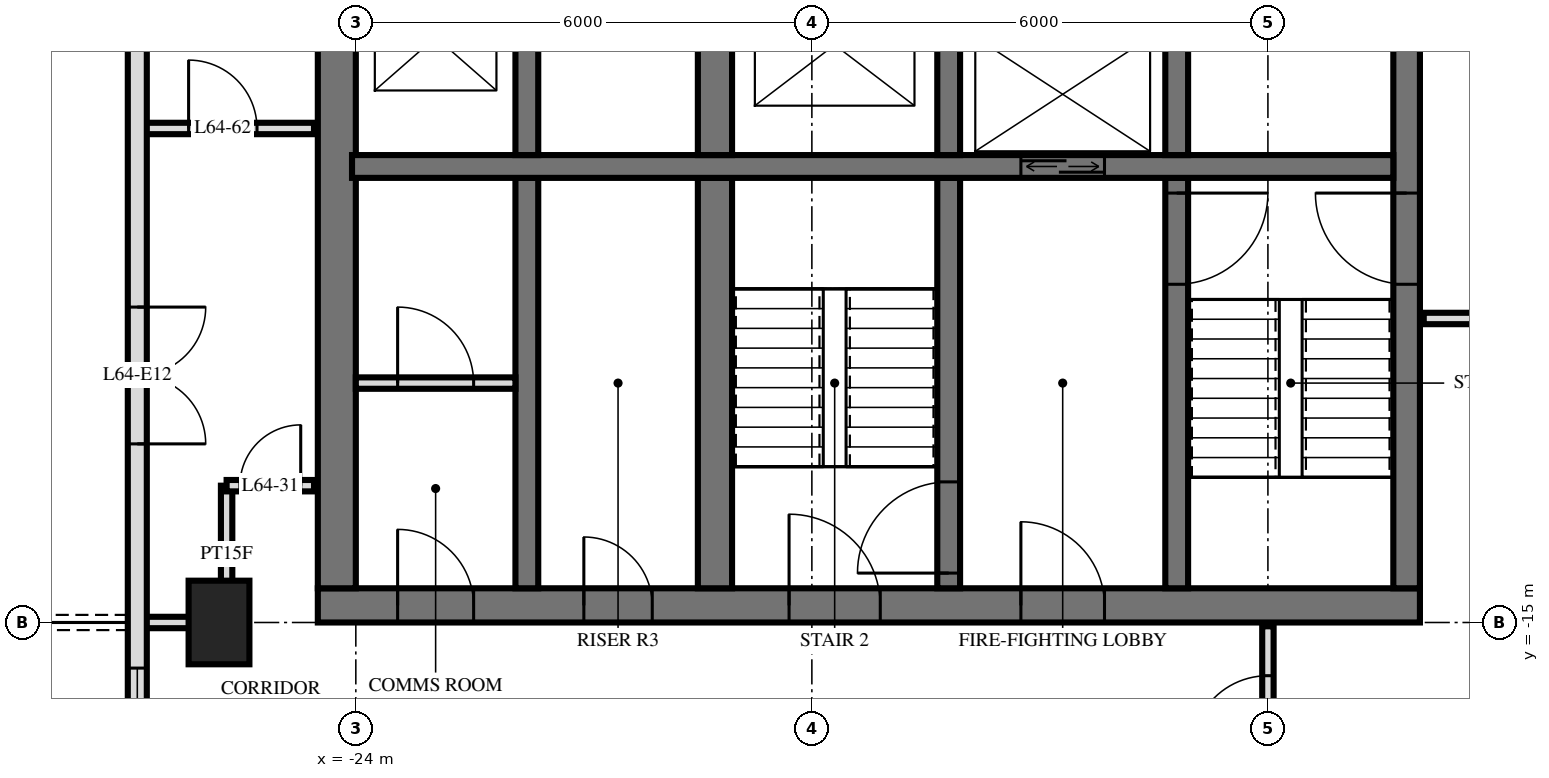
"""IFC4 building model, lengths in metres.
Left out: names, types, materials, properties, quantities, classifications, styles, units other than length and angle.
Written with IfcOpenShell. Run it as: python <this file> out.ifc"""

import sys

from ifc_helpers import new_model, si_unit, direction, frame, frame_2d, origin, origin_2d, place, context, subcontext, project, spatial, rectangle, extrude, element, fill, save


model = new_model("IFC4")
c1 = context("Model", 3, precision=1e-05, world=origin(), true_north=direction((0.0, 1.0)))
c2 = subcontext(c1, "Body", "Model", "MODEL_VIEW")
j1 = project(units=[si_unit("LENGTHUNIT", "METRE"), si_unit("PLANEANGLEUNIT", "RADIAN")], contexts=[c1])
p1 = place(None, origin())
s1 = spatial("IfcSite", under=j1, at=p1, CompositionType="ELEMENT")
p2 = place(p1, origin())
s2 = spatial("IfcBuilding", under=s1, at=p2, CompositionType="ELEMENT")
p3 = place(p2, frame((0.0, 0.0, 243.1)))
s3 = spatial("IfcBuildingStorey", under=s2, at=p3, CompositionType="ELEMENT", Elevation=243.1)
p4 = place(p3, frame((-25.8, -15.0, 0.0), z_axis=(0.0, 0.0, 1.0), x_axis=(0.0, 1.0, 0.0)))
e1 = element("IfcColumn", 1, at=p4, inside=s3, PredefinedType="COLUMN", context=c2, shape_type="SweptSolid", body=[
    extrude(rectangle(XDim=1.1, YDim=0.8, at=origin_2d()), origin(), (0.0, 0.0, 1.0), 3.5),
])
p5 = place(p3, frame((-24.5, -14.775, 0.0), z_axis=(0.0, 0.0, 1.0), x_axis=(1.0, 0.0, 0.0)))
e2 = element("IfcWall", 2, at=p5, inside=s3, PredefinedType="SHEAR", context=c2, shape_type="SweptSolid", body=[
    extrude(rectangle(XDim=14.5, YDim=0.45, at=frame_2d((7.25, 0.0))), origin(), (0.0, 0.0, 1.0), 3.5),
])
p6 = place(p5, frame((6.2, 0.0, 0.0)))
e3 = element("IfcOpeningElement", 3, at=p6, cuts=e2, PredefinedType="OPENING", context=c2, shape_type="SweptSolid", body=[
    extrude(rectangle(XDim=1.2, YDim=2.1, at=frame_2d((0.6, 1.05))), frame((0.0, 0.235, 0.0), z_axis=(0.0, -1.0, 0.0), x_axis=(1.0, 0.0, 0.0)), (0.0, 0.0, 1.0), 0.47),
])
p7 = place(p5, frame((9.25, 0.0, 0.0)))
e4 = element("IfcOpeningElement", 4, at=p7, cuts=e2, PredefinedType="OPENING", context=c2, shape_type="SweptSolid", body=[
    extrude(rectangle(XDim=1.1, YDim=2.1, at=frame_2d((0.55, 1.05))), frame((0.0, 0.235, 0.0), z_axis=(0.0, -1.0, 0.0), x_axis=(1.0, 0.0, 0.0)), (0.0, 0.0, 1.0), 0.47),
])
p8 = place(p5, frame((3.5, 0.0, 0.0)))
e5 = element("IfcOpeningElement", 5, at=p8, cuts=e2, PredefinedType="OPENING", context=c2, shape_type="SweptSolid", body=[
    extrude(rectangle(XDim=0.9, YDim=2.1, at=frame_2d((0.45, 1.05))), frame((0.0, 0.235, 0.0), z_axis=(0.0, -1.0, 0.0), x_axis=(1.0, 0.0, 0.0)), (0.0, 0.0, 1.0), 0.47),
])
p9 = place(p5, frame((1.05, 0.0, 0.0)))
e6 = element("IfcOpeningElement", 6, at=p9, cuts=e2, PredefinedType="OPENING", context=c2, shape_type="SweptSolid", body=[
    extrude(rectangle(XDim=1.0, YDim=2.1, at=frame_2d((0.5, 1.05))), frame((0.0, 0.235, 0.0), z_axis=(0.0, -1.0, 0.0), x_axis=(1.0, 0.0, 0.0)), (0.0, 0.0, 1.0), 0.47),
])
p10 = place(p3, frame((-10.175, -14.55, 0.0), z_axis=(0.0, 0.0, 1.0), x_axis=(0.0, 1.0, 0.0)))
e7 = element("IfcWall", 7, at=p10, inside=s3, PredefinedType="SHEAR", context=c2, shape_type="SweptSolid", body=[
    extrude(rectangle(XDim=14.1, YDim=0.35, at=frame_2d((7.05, 0.0))), origin(), (0.0, 0.0, 1.0), 3.5),
])
p11 = place(p10, frame((8.4, 0.0, 0.0)))
e8 = element("IfcOpeningElement", 8, at=p11, cuts=e7, PredefinedType="OPENING", context=c2, shape_type="SweptSolid", body=[
    extrude(rectangle(XDim=1.4, YDim=2.4, at=frame_2d((0.7, 1.2))), frame((0.0, 0.185, 0.0), z_axis=(0.0, -1.0, 0.0), x_axis=(1.0, 0.0, 0.0)), (0.0, 0.0, 1.0), 0.37),
])
p12 = place(p10, frame((10.0, 0.0, 0.0)))
e9 = element("IfcOpeningElement", 9, at=p12, cuts=e7, PredefinedType="OPENING", context=c2, shape_type="SweptSolid", body=[
    extrude(rectangle(XDim=1.4, YDim=2.4, at=frame_2d((0.7, 1.2))), frame((0.0, 0.185, 0.0), z_axis=(0.0, -1.0, 0.0), x_axis=(1.0, 0.0, 0.0)), (0.0, 0.0, 1.0), 0.37),
])
p13 = place(p10, frame((4.0, 0.0, 0.0)))
e10 = element("IfcOpeningElement", 10, at=p13, cuts=e7, PredefinedType="OPENING", context=c2, shape_type="SweptSolid", body=[
    extrude(rectangle(XDim=1.2, YDim=2.1, at=frame_2d((0.6, 1.05))), frame((0.0, 0.185, 0.0), z_axis=(0.0, -1.0, 0.0), x_axis=(1.0, 0.0, 0.0)), (0.0, 0.0, 1.0), 0.37),
])
p14 = place(p3, frame((-24.25, -14.55, 0.0), z_axis=(0.0, 0.0, 1.0), x_axis=(0.0, 1.0, 0.0)))
e11 = element("IfcWall", 11, at=p14, inside=s3, PredefinedType="SHEAR", context=c2, shape_type="SweptSolid", body=[
    extrude(rectangle(XDim=14.1, YDim=0.5, at=frame_2d((7.05, 0.0))), origin(), (0.0, 0.0, 1.0), 3.5),
])
p15 = place(p3, frame((-24.05, -9.0, 0.0), z_axis=(0.0, 0.0, 1.0), x_axis=(1.0, 0.0, 0.0)))
e12 = element("IfcWall", 12, at=p15, inside=s3, PredefinedType="SHEAR", context=c2, shape_type="SweptSolid", body=[
    extrude(rectangle(XDim=13.7, YDim=0.3, at=frame_2d((6.85, 0.0))), origin(), (0.0, 0.0, 1.0), 3.5),
])
p16 = place(p15, frame((8.8, 0.0, 0.0)))
e13 = element("IfcOpeningElement", 13, at=p16, cuts=e12, PredefinedType="OPENING", context=c2, shape_type="SweptSolid", body=[
    extrude(rectangle(XDim=1.1, YDim=2.1, at=frame_2d((0.55, 1.05))), frame((0.0, 0.16, 0.0), z_axis=(0.0, -1.0, 0.0), x_axis=(1.0, 0.0, 0.0)), (0.0, 0.0, 1.0), 0.32),
])
p17 = place(p3, frame((-13.2, -8.85, 0.0), z_axis=(0.0, 0.0, 1.0), x_axis=(0.0, 1.0, 0.0)))
e14 = element("IfcWall", 14, at=p17, inside=s3, PredefinedType="SHEAR", context=c2, shape_type="SweptSolid", body=[
    extrude(rectangle(XDim=2.3, YDim=0.3, at=frame_2d((1.15, 0.0))), origin(), (0.0, 0.0, 1.0), 3.5),
])
p18 = place(p3, frame((-13.2, -14.55, 0.0), z_axis=(0.0, 0.0, 1.0), x_axis=(0.0, 1.0, 0.0)))
e15 = element("IfcWall", 15, at=p18, inside=s3, PredefinedType="SHEAR", context=c2, shape_type="SweptSolid", body=[
    extrude(rectangle(XDim=5.4, YDim=0.3, at=frame_2d((2.7, 0.0))), origin(), (0.0, 0.0, 1.0), 3.5),
])
p19 = place(p18, frame((4.0, 0.0, 0.0)))
e16 = element("IfcOpeningElement", 16, at=p19, cuts=e15, PredefinedType="OPENING", context=c2, shape_type="SweptSolid", body=[
    extrude(rectangle(XDim=1.2, YDim=2.1, at=frame_2d((0.6, 1.05))), frame((0.0, 0.16, 0.0), z_axis=(0.0, -1.0, 0.0), x_axis=(1.0, 0.0, 0.0)), (0.0, 0.0, 1.0), 0.32),
])
p20 = place(p3, frame((-16.2, -8.85, 0.0), z_axis=(0.0, 0.0, 1.0), x_axis=(0.0, 1.0, 0.0)))
e17 = element("IfcWall", 17, at=p20, inside=s3, PredefinedType="SHEAR", context=c2, shape_type="SweptSolid", body=[
    extrude(rectangle(XDim=2.3, YDim=0.3, at=frame_2d((1.15, 0.0))), origin(), (0.0, 0.0, 1.0), 3.5),
])
p21 = place(p3, frame((-16.2, -14.55, 0.0), z_axis=(0.0, 0.0, 1.0), x_axis=(0.0, 1.0, 0.0)))
e18 = element("IfcWall", 18, at=p21, inside=s3, PredefinedType="SHEAR", context=c2, shape_type="SweptSolid", body=[
    extrude(rectangle(XDim=5.4, YDim=0.3, at=frame_2d((2.7, 0.0))), origin(), (0.0, 0.0, 1.0), 3.5),
])
p22 = place(p21, frame((0.2, 0.0, 0.0)))
e19 = element("IfcOpeningElement", 19, at=p22, cuts=e18, PredefinedType="OPENING", context=c2, shape_type="SweptSolid", body=[
    extrude(rectangle(XDim=1.2, YDim=2.1, at=frame_2d((0.6, 1.05))), frame((0.0, 0.16, 0.0), z_axis=(0.0, -1.0, 0.0), x_axis=(1.0, 0.0, 0.0)), (0.0, 0.0, 1.0), 0.32),
])
p23 = place(p3, frame((-19.275, -8.85, 0.0), z_axis=(0.0, 0.0, 1.0), x_axis=(0.0, 1.0, 0.0)))
e20 = element("IfcWall", 20, at=p23, inside=s3, PredefinedType="SHEAR", context=c2, shape_type="SweptSolid", body=[
    extrude(rectangle(XDim=2.3, YDim=0.45, at=frame_2d((1.15, 0.0))), origin(), (0.0, 0.0, 1.0), 3.5),
])
p24 = place(p3, frame((-19.275, -14.55, 0.0), z_axis=(0.0, 0.0, 1.0), x_axis=(0.0, 1.0, 0.0)))
e21 = element("IfcWall", 21, at=p24, inside=s3, PredefinedType="SHEAR", context=c2, shape_type="SweptSolid", body=[
    extrude(rectangle(XDim=5.4, YDim=0.45, at=frame_2d((2.7, 0.0))), origin(), (0.0, 0.0, 1.0), 3.5),
])
p25 = place(p3, frame((-21.75, -8.85, 0.0), z_axis=(0.0, 0.0, 1.0), x_axis=(0.0, 1.0, 0.0)))
e22 = element("IfcWall", 22, at=p25, inside=s3, PredefinedType="SHEAR", context=c2, shape_type="SweptSolid", body=[
    extrude(rectangle(XDim=2.3, YDim=0.3, at=frame_2d((1.15, 0.0))), origin(), (0.0, 0.0, 1.0), 3.5),
])
p26 = place(p3, frame((-21.75, -14.55, 0.0), z_axis=(0.0, 0.0, 1.0), x_axis=(0.0, 1.0, 0.0)))
e23 = element("IfcWall", 23, at=p26, inside=s3, PredefinedType="SHEAR", context=c2, shape_type="SweptSolid", body=[
    extrude(rectangle(XDim=5.4, YDim=0.3, at=frame_2d((2.7, 0.0))), origin(), (0.0, 0.0, 1.0), 3.5),
])
p27 = place(p3, frame((-26.875, -3.325, 0.0), z_axis=(0.0, 0.0, 1.0), x_axis=(0.0, -1.0, 0.0)))
e24 = element("IfcWall", 24, at=p27, inside=s3, PredefinedType="SOLIDWALL", context=c2, shape_type="SweptSolid", body=[
    extrude(rectangle(XDim=21.551, YDim=0.25, at=frame_2d((10.775, 0.0))), origin(), (0.0, 0.0, 1.0), 3.2),
])
p28 = place(p27, frame((7.525, 0.0, 0.0)))
e25 = element("IfcOpeningElement", 25, at=p28, cuts=e24, PredefinedType="OPENING", context=c2, shape_type="SweptSolid", body=[
    extrude(rectangle(XDim=1.8, YDim=2.4, at=frame_2d((0.9, 1.2))), frame((0.0, 0.135, 0.0), z_axis=(0.0, -1.0, 0.0), x_axis=(1.0, 0.0, 0.0)), (0.0, 0.0, 1.0), 0.27),
])
p29 = place(p27, frame((12.275, 0.0, 0.9)))
e26 = element("IfcOpeningElement", 26, at=p29, cuts=e24, PredefinedType="OPENING", context=c2, shape_type="SweptSolid", body=[
    extrude(rectangle(XDim=1.2, YDim=1.5, at=frame_2d((0.6, 0.75))), frame((0.0, 0.135, 0.0), z_axis=(0.0, -1.0, 0.0), x_axis=(1.0, 0.0, 0.0)), (0.0, 0.0, 1.0), 0.27),
])
p30 = place(p27, frame((15.275, 0.0, 0.0)))
e27 = element("IfcOpeningElement", 27, at=p30, cuts=e24, PredefinedType="OPENING", context=c2, shape_type="SweptSolid", body=[
    extrude(rectangle(XDim=1.8, YDim=2.4, at=frame_2d((0.9, 1.2))), frame((0.0, 0.135, 0.0), z_axis=(0.0, -1.0, 0.0), x_axis=(1.0, 0.0, 0.0)), (0.0, 0.0, 1.0), 0.27),
])
p31 = place(p27, frame((18.875, 0.0, 0.0)))
e28 = element("IfcOpeningElement", 28, at=p31, cuts=e24, PredefinedType="OPENING", context=c2, shape_type="SweptSolid", body=[
    extrude(rectangle(XDim=1.8, YDim=2.4, at=frame_2d((0.9, 1.2))), frame((0.0, 0.135, 0.0), z_axis=(0.0, -1.0, 0.0), x_axis=(1.0, 0.0, 0.0)), (0.0, 0.0, 1.0), 0.27),
])
p32 = place(p3, frame((-24.0, -11.85, 0.0), z_axis=(0.0, 0.0, 1.0), x_axis=(1.0, 0.0, 0.0)))
e29 = element("IfcWall", 29, at=p32, inside=s3, PredefinedType="PARTITIONING", context=c2, shape_type="SweptSolid", body=[
    extrude(rectangle(XDim=2.1, YDim=0.15, at=frame_2d((1.05, 0.0))), origin(), (0.0, 0.0, 1.0), 3.2),
])
p33 = place(p32, frame((0.55, 0.0, 0.0)))
e30 = element("IfcOpeningElement", 30, at=p33, cuts=e29, PredefinedType="OPENING", context=c2, shape_type="SweptSolid", body=[
    extrude(rectangle(XDim=1.0, YDim=2.1, at=frame_2d((0.5, 1.05))), frame((0.0, 0.085, 0.0), z_axis=(0.0, -1.0, 0.0), x_axis=(1.0, 0.0, 0.0)), (0.0, 0.0, 1.0), 0.17),
])
p34 = place(p3, frame((-12.0, -17.4, 0.0), z_axis=(0.0, 0.0, 1.0), x_axis=(0.0, 1.0, 0.0)))
e31 = element("IfcWall", 31, at=p34, inside=s3, PredefinedType="PARTITIONING", context=c2, shape_type="SweptSolid", body=[
    extrude(rectangle(XDim=2.35, YDim=0.15, at=frame_2d((1.175, 0.0))), origin(), (0.0, 0.0, 1.0), 3.22),
])
p35 = place(p34, frame((0.7, 0.0, 0.0)))
e32 = element("IfcOpeningElement", 32, at=p35, cuts=e31, PredefinedType="OPENING", context=c2, shape_type="SweptSolid", body=[
    extrude(rectangle(XDim=1.0, YDim=2.1, at=frame_2d((0.5, 1.05))), frame((0.0, 0.085, 0.0), z_axis=(0.0, -1.0, 0.0), x_axis=(1.0, 0.0, 0.0)), (0.0, 0.0, 1.0), 0.17),
])
p36 = place(p3, frame((-25.7, -15.0, 0.0), z_axis=(0.0, 0.0, 1.0), x_axis=(0.0, 1.0, 0.0)))
e33 = element("IfcWall", 33, at=p36, inside=s3, PredefinedType="PARTITIONING", context=c2, shape_type="SweptSolid", body=[
    extrude(rectangle(XDim=1.8, YDim=0.15, at=frame_2d((0.9, 0.0))), origin(), (0.0, 0.0, 1.0), 3.22),
])
p37 = place(p3, frame((-26.82, -15.0, 0.0), z_axis=(0.0, 0.0, 1.0), x_axis=(1.0, 0.0, 0.0)))
e34 = element("IfcWall", 34, at=p37, inside=s3, PredefinedType="PARTITIONING", context=c2, shape_type="SweptSolid", body=[
    extrude(rectangle(XDim=1.12, YDim=0.15, at=frame_2d((0.56, 0.0))), origin(), (0.0, 0.0, 1.0), 3.22),
])
p38 = place(p3, frame((-25.7, -13.2, 0.0), z_axis=(0.0, 0.0, 1.0), x_axis=(1.0, 0.0, 0.0)))
e35 = element("IfcWall", 35, at=p38, inside=s3, PredefinedType="PARTITIONING", context=c2, shape_type="SweptSolid", body=[
    extrude(rectangle(XDim=1.15, YDim=0.15, at=frame_2d((0.575, 0.0))), origin(), (0.0, 0.0, 1.0), 3.22),
])
p39 = place(p38, frame((0.175, 0.0, 0.0)))
e36 = element("IfcOpeningElement", 36, at=p39, cuts=e35, PredefinedType="OPENING", context=c2, shape_type="SweptSolid", body=[
    extrude(rectangle(XDim=0.8, YDim=2.1, at=frame_2d((0.4, 1.05))), frame((0.0, 0.085, 0.0), z_axis=(0.0, -1.0, 0.0), x_axis=(1.0, 0.0, 0.0)), (0.0, 0.0, 1.0), 0.17),
])
p40 = place(p3, frame((-9.95, -11.0, 0.0), z_axis=(0.0, 0.0, 1.0), x_axis=(1.0, 0.0, 0.0)))
e37 = element("IfcWall", 37, at=p40, inside=s3, PredefinedType="PARTITIONING", context=c2, shape_type="SweptSolid", body=[
    extrude(rectangle(XDim=19.9, YDim=0.15, at=frame_2d((9.95, 0.0))), origin(), (0.0, 0.0, 1.0), 3.22),
])
p41 = place(p40, frame((9.45, 0.0, 0.0)))
e38 = element("IfcOpeningElement", 38, at=p41, cuts=e37, PredefinedType="OPENING", context=c2, shape_type="SweptSolid", body=[
    extrude(rectangle(XDim=1.0, YDim=2.1, at=frame_2d((0.5, 1.05))), frame((0.0, 0.085, 0.0), z_axis=(0.0, -1.0, 0.0), x_axis=(1.0, 0.0, 0.0)), (0.0, 0.0, 1.0), 0.17),
])
p42 = place(p40, frame((3.45, 0.0, 0.0)))
e39 = element("IfcOpeningElement", 39, at=p42, cuts=e37, PredefinedType="OPENING", context=c2, shape_type="SweptSolid", body=[
    extrude(rectangle(XDim=1.0, YDim=2.1, at=frame_2d((0.5, 1.05))), frame((0.0, 0.085, 0.0), z_axis=(0.0, -1.0, 0.0), x_axis=(1.0, 0.0, 0.0)), (0.0, 0.0, 1.0), 0.17),
])
p43 = place(p3, frame((-26.82, -8.5, 0.0), z_axis=(0.0, 0.0, 1.0), x_axis=(1.0, 0.0, 0.0)))
e40 = element("IfcWall", 40, at=p43, inside=s3, PredefinedType="PARTITIONING", context=c2, shape_type="SweptSolid", body=[
    extrude(rectangle(XDim=2.27, YDim=0.15, at=frame_2d((1.135, 0.0))), origin(), (0.0, 0.0, 1.0), 3.22),
])
p44 = place(p43, frame((0.62, 0.0, 0.0)))
e41 = element("IfcOpeningElement", 41, at=p44, cuts=e40, PredefinedType="OPENING", context=c2, shape_type="SweptSolid", body=[
    extrude(rectangle(XDim=0.9, YDim=2.1, at=frame_2d((0.45, 1.05))), frame((0.0, 0.085, 0.0), z_axis=(0.0, -1.0, 0.0), x_axis=(1.0, 0.0, 0.0)), (0.0, 0.0, 1.0), 0.17),
])
p45 = place(p28, origin())
e42 = element("IfcDoor", 42, at=p45, inside=s3, OperationType="DOUBLE_DOOR_SINGLE_SWING", PredefinedType="DOOR", context=c2, shape_type="SweptSolid", body=[
    extrude(rectangle(XDim=1.8, YDim=2.4, at=frame_2d((0.9, 1.2))), frame((0.0, 0.025, 0.0), z_axis=(0.0, -1.0, 0.0), x_axis=(1.0, 0.0, 0.0)), (0.0, 0.0, 1.0), 0.05),
])
fill(e25, e42)
p46 = place(p29, origin())
e43 = element("IfcWindow", 43, at=p46, inside=s3, PartitioningType="SINGLE_PANEL", PredefinedType="WINDOW", context=c2, shape_type="SweptSolid", body=[
    extrude(rectangle(XDim=1.2, YDim=1.5, at=frame_2d((0.6, 0.75))), frame((0.0, 0.03, 0.0), z_axis=(0.0, -1.0, 0.0), x_axis=(1.0, 0.0, 0.0)), (0.0, 0.0, 1.0), 0.06),
])
fill(e26, e43)
p47 = place(p16, origin())
e44 = element("IfcDoor", 44, at=p47, inside=s3, OperationType="DOUBLE_DOOR_SLIDING", PredefinedType="USERDEFINED", context=c2, shape_type="SweptSolid", body=[
    extrude(rectangle(XDim=1.1, YDim=2.1, at=frame_2d((0.55, 1.05))), frame((0.0, 0.025, 0.0), z_axis=(0.0, -1.0, 0.0), x_axis=(1.0, 0.0, 0.0)), (0.0, 0.0, 1.0), 0.05),
])
fill(e13, e44)
p48 = place(p13, origin())
e45 = element("IfcDoor", 45, at=p48, inside=s3, OperationType="SINGLE_SWING_LEFT", PredefinedType="DOOR", context=c2, shape_type="SweptSolid", body=[
    extrude(rectangle(XDim=1.2, YDim=2.1, at=frame_2d((0.6, 1.05))), frame((0.0, 0.025, 0.0), z_axis=(0.0, -1.0, 0.0), x_axis=(1.0, 0.0, 0.0)), (0.0, 0.0, 1.0), 0.05),
])
fill(e10, e45)
p49 = place(p6, origin())
e46 = element("IfcDoor", 46, at=p49, inside=s3, OperationType="SINGLE_SWING_RIGHT", PredefinedType="DOOR", context=c2, shape_type="SweptSolid", body=[
    extrude(rectangle(XDim=1.2, YDim=2.1, at=frame_2d((0.6, 1.05))), frame((0.0, 0.025, 0.0), z_axis=(0.0, -1.0, 0.0), x_axis=(1.0, 0.0, 0.0)), (0.0, 0.0, 1.0), 0.05),
])
fill(e3, e46)
p50 = place(p7, origin())
e47 = element("IfcDoor", 47, at=p50, inside=s3, OperationType="SINGLE_SWING_RIGHT", PredefinedType="DOOR", context=c2, shape_type="SweptSolid", body=[
    extrude(rectangle(XDim=1.1, YDim=2.1, at=frame_2d((0.55, 1.05))), frame((0.0, 0.025, 0.0), z_axis=(0.0, -1.0, 0.0), x_axis=(1.0, 0.0, 0.0)), (0.0, 0.0, 1.0), 0.05),
])
fill(e4, e47)
p51 = place(p8, origin())
e48 = element("IfcDoor", 48, at=p51, inside=s3, OperationType="SINGLE_SWING_RIGHT", PredefinedType="DOOR", context=c2, shape_type="SweptSolid", body=[
    extrude(rectangle(XDim=0.9, YDim=2.1, at=frame_2d((0.45, 1.05))), frame((0.0, 0.025, 0.0), z_axis=(0.0, -1.0, 0.0), x_axis=(1.0, 0.0, 0.0)), (0.0, 0.0, 1.0), 0.05),
])
fill(e5, e48)
p52 = place(p9, origin())
e49 = element("IfcDoor", 49, at=p52, inside=s3, OperationType="SINGLE_SWING_RIGHT", PredefinedType="DOOR", context=c2, shape_type="SweptSolid", body=[
    extrude(rectangle(XDim=1.0, YDim=2.1, at=frame_2d((0.5, 1.05))), frame((0.0, 0.025, 0.0), z_axis=(0.0, -1.0, 0.0), x_axis=(1.0, 0.0, 0.0)), (0.0, 0.0, 1.0), 0.05),
])
fill(e6, e49)
p53 = place(p19, frame((0.6, 0.0, 0.0), z_axis=(0.0, 0.0, 1.0), x_axis=(-1.0, 0.0, 0.0)))
e50 = element("IfcDoor", 50, at=p53, inside=s3, OperationType="SINGLE_SWING_RIGHT", PredefinedType="DOOR", context=c2, shape_type="SweptSolid", body=[
    extrude(rectangle(XDim=1.2, YDim=2.1, at=frame_2d((0.0, 1.05))), frame((0.0, -0.025, 0.0), z_axis=(0.0, 1.0, 0.0), x_axis=(-1.0, 0.0, 0.0)), (0.0, 0.0, 1.0), 0.05),
])
fill(e16, e50)
p54 = place(p22, origin())
e51 = element("IfcDoor", 51, at=p54, inside=s3, OperationType="SINGLE_SWING_RIGHT", PredefinedType="DOOR", context=c2, shape_type="SweptSolid", body=[
    extrude(rectangle(XDim=1.2, YDim=2.1, at=frame_2d((0.6, 1.05))), frame((0.0, 0.025, 0.0), z_axis=(0.0, -1.0, 0.0), x_axis=(1.0, 0.0, 0.0)), (0.0, 0.0, 1.0), 0.05),
])
fill(e19, e51)
p55 = place(p33, origin())
e52 = element("IfcDoor", 52, at=p55, inside=s3, OperationType="SINGLE_SWING_RIGHT", PredefinedType="DOOR", context=c2, shape_type="SweptSolid", body=[
    extrude(rectangle(XDim=1.0, YDim=2.1, at=frame_2d((0.5, 1.05))), frame((0.0, 0.025, 0.0), z_axis=(0.0, -1.0, 0.0), x_axis=(1.0, 0.0, 0.0)), (0.0, 0.0, 1.0), 0.05),
])
fill(e30, e52)
p56 = place(p35, origin())
e53 = element("IfcDoor", 53, at=p56, inside=s3, OperationType="SINGLE_SWING_RIGHT", PredefinedType="DOOR", context=c2, shape_type="SweptSolid", body=[
    extrude(rectangle(XDim=1.0, YDim=2.1, at=frame_2d((0.5, 1.05))), frame((0.0, 0.025, 0.0), z_axis=(0.0, -1.0, 0.0), x_axis=(1.0, 0.0, 0.0)), (0.0, 0.0, 1.0), 0.05),
])
fill(e32, e53)
p57 = place(p39, origin())
e54 = element("IfcDoor", 54, at=p57, inside=s3, OperationType="SINGLE_SWING_LEFT", PredefinedType="DOOR", context=c2, shape_type="SweptSolid", body=[
    extrude(rectangle(XDim=0.8, YDim=2.1, at=frame_2d((0.4, 1.05))), frame((0.0, 0.025, 0.0), z_axis=(0.0, -1.0, 0.0), x_axis=(1.0, 0.0, 0.0)), (0.0, 0.0, 1.0), 0.05),
])
fill(e36, e54)
p58 = place(p44, origin())
e55 = element("IfcDoor", 55, at=p58, inside=s3, OperationType="SINGLE_SWING_RIGHT", PredefinedType="DOOR", context=c2, shape_type="SweptSolid", body=[
    extrude(rectangle(XDim=0.9, YDim=2.1, at=frame_2d((0.45, 1.05))), frame((0.0, 0.025, 0.0), z_axis=(0.0, -1.0, 0.0), x_axis=(1.0, 0.0, 0.0)), (0.0, 0.0, 1.0), 0.05),
])
fill(e41, e55)
save(model, sys.argv[1])
